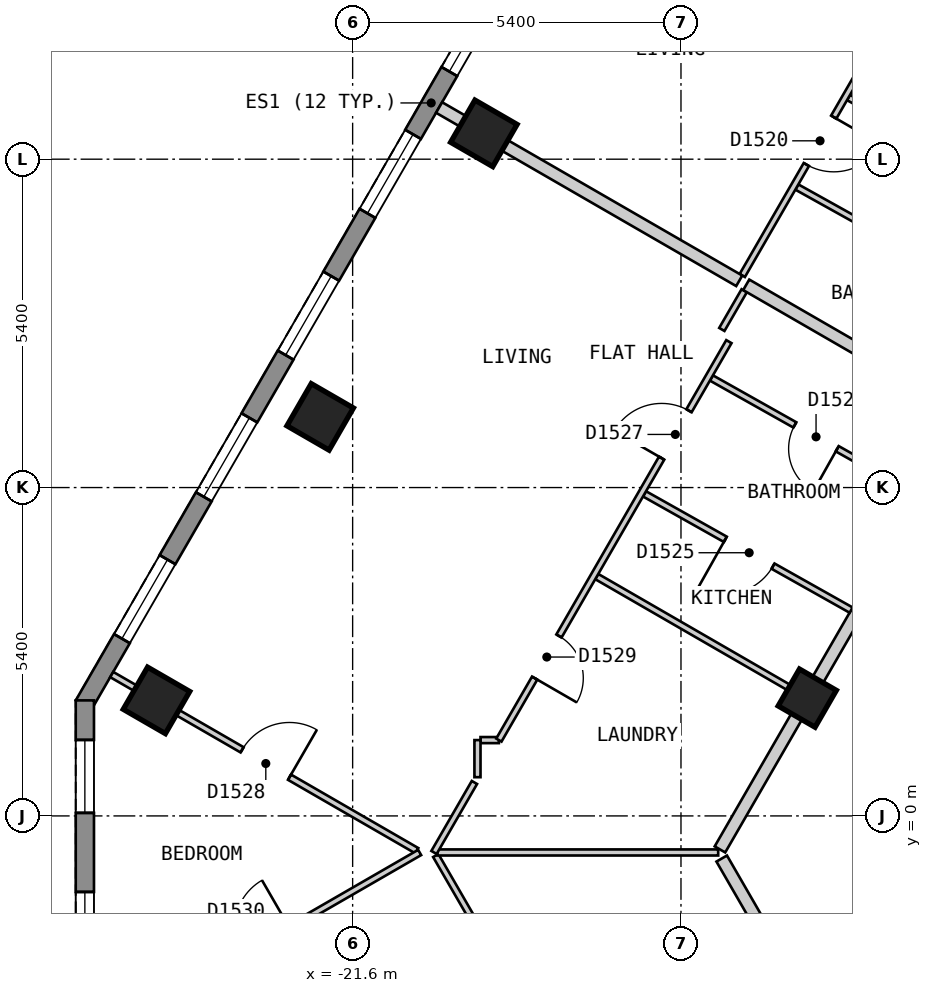
"""IFC4 building model, lengths in metres.
Left out: names, types, materials, properties, quantities, classifications, styles, units other than length and angle.
Written with IfcOpenShell. Run it as: python <this file> out.ifc"""

import sys

from ifc_helpers import new_model, si_unit, direction, frame, frame_2d, origin, origin_2d, place, context, subcontext, project, spatial, polyline, rectangle, outline, extrude, element, fill, save


model = new_model("IFC4")
c1 = context("Model", 3, precision=1e-05, world=origin(), true_north=direction((0.0, 1.0)))
c2 = subcontext(c1, "Body", "Model", "MODEL_VIEW")
j1 = project(units=[si_unit("LENGTHUNIT", "METRE"), si_unit("PLANEANGLEUNIT", "RADIAN")], contexts=[c1])
p1 = place(None, origin())
s1 = spatial("IfcSite", under=j1, at=p1, CompositionType="ELEMENT")
p2 = place(p1, origin())
s2 = spatial("IfcBuilding", under=s1, at=p2, CompositionType="ELEMENT")
p3 = place(p2, frame((0.0, 0.0, 190.2)))
s3 = spatial("IfcBuildingStorey", under=s2, at=p3, CompositionType="ELEMENT", Elevation=190.2)
for number, where, z_axis, x_axis in (
    (1, (-19.442, 11.225, 0.0), (0.0, 0.0, 1.0), (-0.5, -0.866, 0.0)),
    (2, (-22.134, 6.562, 0.0), (0.0, 0.0, 1.0), (-0.5, -0.866, 0.0)),
    (3, (-24.826, 1.9, 0.0), (0.0, 0.0, 1.0), (-0.5, -0.866, 0.0)),
):
    element("IfcColumn", number, at=place(p3, frame(where, z_axis=z_axis, x_axis=x_axis)), inside=s3, PredefinedType="COLUMN", context=c2, shape_type="SweptSolid", body=[
        extrude(rectangle(XDim=0.8, YDim=0.8, at=origin_2d()), origin(), (0.0, 0.0, 1.0), 3.0),
    ])
p4 = place(p3, frame((-14.123, 1.937, 0.0), z_axis=(0.0, 0.0, 1.0), x_axis=(-0.5, -0.866025403784, 0.0)))
e4 = element("IfcColumn", 4, at=p4, inside=s3, PredefinedType="COLUMN", context=c2, shape_type="SweptSolid", body=[
    extrude(rectangle(XDim=0.7, YDim=0.7, at=origin_2d()), origin(), (0.0, 0.0, 1.0), 3.0),
])
p5 = place(p3, frame((-14.592, 21.625, 0.0), z_axis=(0.0, 0.0, 1.0), x_axis=(-0.500010537973, -0.866019319597, 0.0)))
e5 = element("IfcWall", 5, at=p5, inside=s3, PredefinedType="SOLIDWALL", context=c2, shape_type="SweptSolid", body=[
    extrude(outline(polyline([(0.0, -0.15), (22.863, -0.15), (22.783, 0.15), (0.08, 0.15), (0.0, -0.15)])), origin(), (0.0, 0.0, 1.0), 2.7),
])
p6 = place(p5, frame((1.259, 0.0, 0.15)))
e6 = element("IfcOpeningElement", 6, at=p6, cuts=e5, PredefinedType="OPENING", context=c2, shape_type="SweptSolid", body=[
    extrude(rectangle(XDim=1.5, YDim=2.1, at=frame_2d((0.75, 1.05))), frame((0.0, 0.16, 0.0), z_axis=(0.0, -1.0, 0.0), x_axis=(1.0, 0.0, 0.0)), (0.0, 0.0, 1.0), 0.32),
])
p7 = place(p5, frame((3.952, 0.0, 0.15)))
e7 = element("IfcOpeningElement", 7, at=p7, cuts=e5, PredefinedType="OPENING", context=c2, shape_type="SweptSolid", body=[
    extrude(rectangle(XDim=1.5, YDim=2.1, at=frame_2d((0.75, 1.05))), frame((0.0, 0.16, 0.0), z_axis=(0.0, -1.0, 0.0), x_axis=(1.0, 0.0, 0.0)), (0.0, 0.0, 1.0), 0.32),
])
p8 = place(p5, frame((6.644, 0.0, 0.15)))
e8 = element("IfcOpeningElement", 8, at=p8, cuts=e5, PredefinedType="OPENING", context=c2, shape_type="SweptSolid", body=[
    extrude(rectangle(XDim=1.5, YDim=2.1, at=frame_2d((0.75, 1.05))), frame((0.0, 0.16, 0.0), z_axis=(0.0, -1.0, 0.0), x_axis=(1.0, 0.0, 0.0)), (0.0, 0.0, 1.0), 0.32),
])
p9 = place(p5, frame((9.335, 0.0, 0.15)))
e9 = element("IfcOpeningElement", 9, at=p9, cuts=e5, PredefinedType="OPENING", context=c2, shape_type="SweptSolid", body=[
    extrude(rectangle(XDim=1.5, YDim=2.1, at=frame_2d((0.75, 1.05))), frame((0.0, 0.16, 0.0), z_axis=(0.0, -1.0, 0.0), x_axis=(1.0, 0.0, 0.0)), (0.0, 0.0, 1.0), 0.32),
])
p10 = place(p5, frame((12.028, 0.0, 0.15)))
e10 = element("IfcOpeningElement", 10, at=p10, cuts=e5, PredefinedType="OPENING", context=c2, shape_type="SweptSolid", body=[
    extrude(rectangle(XDim=1.5, YDim=2.1, at=frame_2d((0.75, 1.05))), frame((0.0, 0.16, 0.0), z_axis=(0.0, -1.0, 0.0), x_axis=(1.0, 0.0, 0.0)), (0.0, 0.0, 1.0), 0.32),
])
p11 = place(p5, frame((14.72, 0.0, 0.15)))
e11 = element("IfcOpeningElement", 11, at=p11, cuts=e5, PredefinedType="OPENING", context=c2, shape_type="SweptSolid", body=[
    extrude(rectangle(XDim=1.5, YDim=2.1, at=frame_2d((0.75, 1.05))), frame((0.0, 0.16, 0.0), z_axis=(0.0, -1.0, 0.0), x_axis=(1.0, 0.0, 0.0)), (0.0, 0.0, 1.0), 0.32),
])
p12 = place(p5, frame((17.411, 0.0, 0.15)))
e12 = element("IfcOpeningElement", 12, at=p12, cuts=e5, PredefinedType="OPENING", context=c2, shape_type="SweptSolid", body=[
    extrude(rectangle(XDim=1.5, YDim=2.1, at=frame_2d((0.75, 1.05))), frame((0.0, 0.16, 0.0), z_axis=(0.0, -1.0, 0.0), x_axis=(1.0, 0.0, 0.0)), (0.0, 0.0, 1.0), 0.32),
])
p13 = place(p5, frame((20.104, 0.0, 0.15)))
e13 = element("IfcOpeningElement", 13, at=p13, cuts=e5, PredefinedType="OPENING", context=c2, shape_type="SweptSolid", body=[
    extrude(rectangle(XDim=1.5, YDim=2.1, at=frame_2d((0.75, 1.05))), frame((0.0, 0.16, 0.0), z_axis=(0.0, -1.0, 0.0), x_axis=(1.0, 0.0, 0.0)), (0.0, 0.0, 1.0), 0.32),
])
p14 = place(p3, frame((-26.004, 1.9, 0.0), z_axis=(0.0, 0.0, 1.0), x_axis=(0.0, -1.0, 0.0)))
e14 = element("IfcWall", 14, at=p14, inside=s3, PredefinedType="SOLIDWALL", context=c2, shape_type="SweptSolid", body=[
    extrude(outline(polyline([(0.0, -0.15), (5.0, -0.15), (4.92, 0.15), (0.08, 0.15), (0.0, -0.15)])), origin(), (0.0, 0.0, 1.0), 2.7),
])
p15 = place(p14, frame((0.65, 0.0, 0.15)))
e15 = element("IfcOpeningElement", 15, at=p15, cuts=e14, PredefinedType="OPENING", context=c2, shape_type="SweptSolid", body=[
    extrude(rectangle(XDim=1.2, YDim=2.1, at=frame_2d((0.6, 1.05))), frame((0.0, 0.16, 0.0), z_axis=(0.0, -1.0, 0.0), x_axis=(1.0, 0.0, 0.0)), (0.0, 0.0, 1.0), 0.32),
])
p16 = place(p14, frame((3.15, 0.0, 0.15)))
e16 = element("IfcOpeningElement", 16, at=p16, cuts=e14, PredefinedType="OPENING", context=c2, shape_type="SweptSolid", body=[
    extrude(rectangle(XDim=1.2, YDim=2.1, at=frame_2d((0.6, 1.05))), frame((0.0, 0.16, 0.0), z_axis=(0.0, -1.0, 0.0), x_axis=(1.0, 0.0, 0.0)), (0.0, 0.0, 1.0), 0.32),
])
p17 = place(p3, frame((-15.53, -0.701, 0.0), z_axis=(0.0, 0.0, 1.0), x_axis=(0.499972710878, -0.866041158593, 0.0)))
e17 = element("IfcWall", 17, at=p17, inside=s3, PredefinedType="PARTITIONING", context=c2, shape_type="SweptSolid", body=[
    extrude(rectangle(XDim=2.308, YDim=0.2, at=frame_2d((1.154, 0.0))), origin(), (0.0, 0.0, 1.0), 2.7),
])
p18 = place(p3, frame((-15.559, -0.551, 0.0), z_axis=(0.0, 0.0, 1.0), x_axis=(0.499964997208, 0.866045611713, 0.0)))
e18 = element("IfcWall", 18, at=p18, inside=s3, PredefinedType="PARTITIONING", context=c2, shape_type="SweptSolid", body=[
    extrude(rectangle(XDim=9.643, YDim=0.2, at=frame_2d((4.821, 0.0))), origin(), (0.0, 0.0, 1.0), 2.7),
])
p19 = place(p18, frame((5.088, 0.0, 0.0)))
e19 = element("IfcOpeningElement", 19, at=p19, cuts=e18, PredefinedType="OPENING", context=c2, shape_type="SweptSolid", body=[
    extrude(rectangle(XDim=1.0, YDim=2.1, at=frame_2d((0.5, 1.05))), frame((0.0, 0.11, 0.0), z_axis=(0.0, -1.0, 0.0), x_axis=(1.0, 0.0, 0.0)), (0.0, 0.0, 1.0), 0.22),
])
p20 = place(p3, frame((-20.233, -0.651, 0.0), z_axis=(0.0, 0.0, 1.0), x_axis=(0.500498449207, -0.865737432679, 0.0)))
e20 = element("IfcWall", 20, at=p20, inside=s3, PredefinedType="PARTITIONING", context=c2, shape_type="SweptSolid", body=[
    extrude(rectangle(XDim=1.271, YDim=0.1, at=frame_2d((0.635, 0.0))), origin(), (0.0, 0.0, 1.0), 2.7),
])
p21 = place(p3, frame((-13.444, 11.814, 0.0), z_axis=(0.0, 0.0, 1.0), x_axis=(0.873653620945, -0.486548405207, 0.0)))
e21 = element("IfcWall", 21, at=p21, inside=s3, PredefinedType="PARTITIONING", context=c2, shape_type="SweptSolid", body=[
    extrude(rectangle(XDim=4.051, YDim=0.1, at=frame_2d((2.025, 0.0))), origin(), (0.0, 0.0, 1.0), 2.7),
])
p22 = place(p21, frame((1.6, 0.0, 0.0)))
e22 = element("IfcOpeningElement", 22, at=p22, cuts=e21, PredefinedType="OPENING", context=c2, shape_type="SweptSolid", body=[
    extrude(rectangle(XDim=0.9, YDim=2.1, at=frame_2d((0.45, 1.05))), frame((0.0, 0.06, 0.0), z_axis=(0.0, -1.0, 0.0), x_axis=(1.0, 0.0, 0.0)), (0.0, 0.0, 1.0), 0.12),
])
p23 = place(p3, frame((-14.294, 10.342, 0.0), z_axis=(0.0, 0.0, 1.0), x_axis=(0.873582256032, -0.486676527013, 0.0)))
e23 = element("IfcWall", 23, at=p23, inside=s3, PredefinedType="PARTITIONING", context=c2, shape_type="SweptSolid", body=[
    extrude(rectangle(XDim=4.05, YDim=0.1, at=frame_2d((2.025, 0.0))), origin(), (0.0, 0.0, 1.0), 2.7),
])
p24 = place(p23, frame((1.65, 0.0, 0.0)))
e24 = element("IfcOpeningElement", 24, at=p24, cuts=e23, PredefinedType="OPENING", context=c2, shape_type="SweptSolid", body=[
    extrude(rectangle(XDim=0.8, YDim=2.1, at=frame_2d((0.4, 1.05))), frame((0.0, 0.06, 0.0), z_axis=(0.0, -1.0, 0.0), x_axis=(1.0, 0.0, 0.0)), (0.0, 0.0, 1.0), 0.12),
])
p25 = place(p3, frame((-16.799, 5.296, 0.0), z_axis=(0.0, 0.0, 1.0), x_axis=(0.871565499758, -0.490279083413, 0.0)))
e25 = element("IfcWall", 25, at=p25, inside=s3, PredefinedType="PARTITIONING", context=c2, shape_type="SweptSolid", body=[
    extrude(rectangle(XDim=3.897, YDim=0.1, at=frame_2d((1.949, 0.0))), origin(), (0.0, 0.0, 1.0), 2.7),
])
p26 = place(p25, frame((1.524, 0.0, 0.0)))
e26 = element("IfcOpeningElement", 26, at=p26, cuts=e25, PredefinedType="OPENING", context=c2, shape_type="SweptSolid", body=[
    extrude(rectangle(XDim=0.9, YDim=2.1, at=frame_2d((0.45, 1.05))), frame((0.0, 0.06, 0.0), z_axis=(0.0, -1.0, 0.0), x_axis=(1.0, 0.0, 0.0)), (0.0, 0.0, 1.0), 0.12),
])
p27 = place(p3, frame((-15.699, 7.202, 0.0), z_axis=(0.0, 0.0, 1.0), x_axis=(0.871565499758, -0.490279083413, 0.0)))
e27 = element("IfcWall", 27, at=p27, inside=s3, PredefinedType="PARTITIONING", context=c2, shape_type="SweptSolid", body=[
    extrude(rectangle(XDim=3.897, YDim=0.1, at=frame_2d((1.949, 0.0))), origin(), (0.0, 0.0, 1.0), 2.7),
])
p28 = place(p27, frame((1.574, 0.0, 0.0)))
e28 = element("IfcOpeningElement", 28, at=p28, cuts=e27, PredefinedType="OPENING", context=c2, shape_type="SweptSolid", body=[
    extrude(rectangle(XDim=0.8, YDim=2.1, at=frame_2d((0.4, 1.05))), frame((0.0, 0.06, 0.0), z_axis=(0.0, -1.0, 0.0), x_axis=(1.0, 0.0, 0.0)), (0.0, 0.0, 1.0), 0.12),
])
p29 = place(p3, frame((-17.585, 3.936, 0.0), z_axis=(0.0, 0.0, 1.0), x_axis=(0.865979019114, -0.500080332001, 0.0)))
e29 = element("IfcWall", 29, at=p29, inside=s3, PredefinedType="PARTITIONING", context=c2, shape_type="SweptSolid", body=[
    extrude(rectangle(XDim=3.897, YDim=0.1, at=frame_2d((1.949, 0.0))), origin(), (0.0, 0.0, 1.0), 2.7),
])
p30 = place(p3, frame((-25.562, 2.325, 0.0), z_axis=(0.0, 0.0, 1.0), x_axis=(0.86599890761, -0.500045889912, 0.0)))
e30 = element("IfcWall", 30, at=p30, inside=s3, PredefinedType="PARTITIONING", context=c2, shape_type="SweptSolid", body=[
    extrude(rectangle(XDim=5.793, YDim=0.1, at=frame_2d((2.897, 0.0))), origin(), (0.0, 0.0, 1.0), 2.7),
])
p31 = place(p30, frame((2.476, 0.0, 0.0)))
e31 = element("IfcOpeningElement", 31, at=p31, cuts=e30, PredefinedType="OPENING", context=c2, shape_type="SweptSolid", body=[
    extrude(rectangle(XDim=0.9, YDim=2.1, at=frame_2d((0.45, 1.05))), frame((0.0, 0.06, 0.0), z_axis=(0.0, -1.0, 0.0), x_axis=(1.0, 0.0, 0.0)), (0.0, 0.0, 1.0), 0.12),
])
p32 = place(p3, frame((-20.204, -0.601, 0.0), z_axis=(0.0, 0.0, 1.0), x_axis=(1.0, 0.0, 0.0)))
e32 = element("IfcWall", 32, at=p32, inside=s3, PredefinedType="PARTITIONING", context=c2, shape_type="SweptSolid", body=[
    extrude(rectangle(XDim=4.616, YDim=0.1, at=frame_2d((2.308, 0.0))), origin(), (0.0, 0.0, 1.0), 2.7),
])
p33 = place(p3, frame((-19.497, 1.247, 0.0), z_axis=(0.0, 0.0, 1.0), x_axis=(1.0, 0.0, 0.0)))
e33 = element("IfcWall", 33, at=p33, inside=s3, PredefinedType="PARTITIONING", context=c2, shape_type="SweptSolid", body=[
    extrude(rectangle(XDim=0.302, YDim=0.1, at=frame_2d((0.151, 0.0))), origin(), (0.0, 0.0, 1.0), 2.7),
])
p34 = place(p3, frame((-20.262, -0.601, 0.0), z_axis=(0.0, 0.0, 1.0), x_axis=(0.500247001515, 0.86588275042, 0.0)))
e34 = element("IfcWall", 34, at=p34, inside=s3, PredefinedType="PARTITIONING", context=c2, shape_type="SweptSolid", body=[
    extrude(rectangle(XDim=1.329, YDim=0.1, at=frame_2d((0.665, 0.0))), origin(), (0.0, 0.0, 1.0), 2.7),
])
p35 = place(p3, frame((-19.195, 1.247, 0.0), z_axis=(0.0, 0.0, 1.0), x_axis=(0.499959862915, 0.866048575701, 0.0)))
e35 = element("IfcWall", 35, at=p35, inside=s3, PredefinedType="PARTITIONING", context=c2, shape_type="SweptSolid", body=[
    extrude(rectangle(XDim=7.566, YDim=0.1, at=frame_2d((3.783, 0.0))), origin(), (0.0, 0.0, 1.0), 2.7),
])
p36 = place(p35, frame((5.354, 0.0, 0.0)))
e36 = element("IfcOpeningElement", 36, at=p36, cuts=e35, PredefinedType="OPENING", context=c2, shape_type="SweptSolid", body=[
    extrude(rectangle(XDim=0.9, YDim=2.1, at=frame_2d((0.45, 1.05))), frame((0.0, 0.06, 0.0), z_axis=(0.0, -1.0, 0.0), x_axis=(1.0, 0.0, 0.0)), (0.0, 0.0, 1.0), 0.12),
])
p37 = place(p35, frame((1.177, 0.0, 0.0)))
e37 = element("IfcOpeningElement", 37, at=p37, cuts=e35, PredefinedType="OPENING", context=c2, shape_type="SweptSolid", body=[
    extrude(rectangle(XDim=0.8, YDim=2.1, at=frame_2d((0.4, 1.05))), frame((0.0, 0.06, 0.0), z_axis=(0.0, -1.0, 0.0), x_axis=(1.0, 0.0, 0.0)), (0.0, 0.0, 1.0), 0.12),
])
p38 = place(p3, frame((-15.528, 8.0, 0.0), z_axis=(0.0, 0.0, 1.0), x_axis=(0.500421336976, 0.865782008071, 0.0)))
e38 = element("IfcWall", 38, at=p38, inside=s3, PredefinedType="PARTITIONING", context=c2, shape_type="SweptSolid", body=[
    extrude(rectangle(XDim=0.736, YDim=0.1, at=frame_2d((0.368, 0.0))), origin(), (0.0, 0.0, 1.0), 2.7),
])
p39 = place(p3, frame((-15.192, 8.887, 0.0), z_axis=(0.0, 0.0, 1.0), x_axis=(0.500028204665, 0.866009119201, 0.0)))
e39 = element("IfcWall", 39, at=p39, inside=s3, PredefinedType="PARTITIONING", context=c2, shape_type="SweptSolid", body=[
    extrude(rectangle(XDim=10.667, YDim=0.1, at=frame_2d((5.334, 0.0))), origin(), (0.0, 0.0, 1.0), 2.7),
])
p40 = place(p39, frame((2.108, 0.0, 0.0)))
e40 = element("IfcOpeningElement", 40, at=p40, cuts=e39, PredefinedType="OPENING", context=c2, shape_type="SweptSolid", body=[
    extrude(rectangle(XDim=0.9, YDim=2.1, at=frame_2d((0.45, 1.05))), frame((0.0, 0.06, 0.0), z_axis=(0.0, -1.0, 0.0), x_axis=(1.0, 0.0, 0.0)), (0.0, 0.0, 1.0), 0.12),
])
p41 = place(p39, frame((7.576, 0.0, 0.0)))
e41 = element("IfcOpeningElement", 41, at=p41, cuts=e39, PredefinedType="OPENING", context=c2, shape_type="SweptSolid", body=[
    extrude(rectangle(XDim=0.8, YDim=2.1, at=frame_2d((0.4, 1.05))), frame((0.0, 0.06, 0.0), z_axis=(0.0, -1.0, 0.0), x_axis=(1.0, 0.0, 0.0)), (0.0, 0.0, 1.0), 0.12),
])
p42 = place(p3, frame((-19.547, 0.637, 0.0), z_axis=(0.0, 0.0, 1.0), x_axis=(0.0, 1.0, 0.0)))
e42 = element("IfcWall", 42, at=p42, inside=s3, PredefinedType="PARTITIONING", context=c2, shape_type="SweptSolid", body=[
    extrude(rectangle(XDim=0.61, YDim=0.1, at=frame_2d((0.305, 0.0))), origin(), (0.0, 0.0, 1.0), 2.7),
])
p43 = place(p3, frame((-25.563, -3.524, 0.0), z_axis=(0.0, 0.0, 1.0), x_axis=(0.866128586522, 0.499821239653, 0.0)))
e43 = element("IfcWall", 43, at=p43, inside=s3, PredefinedType="PARTITIONING", context=c2, shape_type="SweptSolid", body=[
    extrude(rectangle(XDim=5.848, YDim=0.1, at=frame_2d((2.924, 0.0))), origin(), (0.0, 0.0, 1.0), 2.7),
])
p44 = place(p43, frame((2.474, 0.0, 0.0)))
e44 = element("IfcOpeningElement", 44, at=p44, cuts=e43, PredefinedType="OPENING", context=c2, shape_type="SweptSolid", body=[
    extrude(rectangle(XDim=0.9, YDim=2.1, at=frame_2d((0.45, 1.05))), frame((0.0, 0.06, 0.0), z_axis=(0.0, -1.0, 0.0), x_axis=(1.0, 0.0, 0.0)), (0.0, 0.0, 1.0), 0.12),
])
p45 = place(p3, frame((-20.178, 11.65, 0.0), z_axis=(0.0, 0.0, 1.0), x_axis=(0.866022950691, -0.500004248858, 0.0)))
e45 = element("IfcWall", 45, at=p45, inside=s3, PredefinedType="PARTITIONING", context=c2, shape_type="SweptSolid", body=[
    extrude(rectangle(XDim=5.7, YDim=0.2, at=frame_2d((2.85, 0.0))), origin(), (0.0, 0.0, 1.0), 2.7),
])
p46 = place(p3, frame((-15.127, 8.734, 0.0), z_axis=(0.0, 0.0, 1.0), x_axis=(0.865984601828, -0.500070664403, 0.0)))
e46 = element("IfcWall", 46, at=p46, inside=s3, PredefinedType="PARTITIONING", context=c2, shape_type="SweptSolid", body=[
    extrude(rectangle(XDim=4.167, YDim=0.2, at=frame_2d((2.084, 0.0))), origin(), (0.0, 0.0, 1.0), 2.7),
])
p47 = place(p9, origin())
e47 = element("IfcWindow", 47, at=p47, inside=s3, PartitioningType="SINGLE_PANEL", PredefinedType="WINDOW", context=c2, shape_type="SweptSolid", body=[
    extrude(rectangle(XDim=1.5, YDim=2.1, at=frame_2d((0.75, 1.05))), frame((0.0, 0.03, 0.0), z_axis=(0.0, -1.0, 0.0), x_axis=(1.0, 0.0, 0.0)), (0.0, 0.0, 1.0), 0.06),
])
fill(e9, e47)
p48 = place(p10, origin())
e48 = element("IfcWindow", 48, at=p48, inside=s3, PartitioningType="SINGLE_PANEL", PredefinedType="WINDOW", context=c2, shape_type="SweptSolid", body=[
    extrude(rectangle(XDim=1.5, YDim=2.1, at=frame_2d((0.75, 1.05))), frame((0.0, 0.03, 0.0), z_axis=(0.0, -1.0, 0.0), x_axis=(1.0, 0.0, 0.0)), (0.0, 0.0, 1.0), 0.06),
])
fill(e10, e48)
p49 = place(p11, origin())
e49 = element("IfcWindow", 49, at=p49, inside=s3, PartitioningType="SINGLE_PANEL", PredefinedType="WINDOW", context=c2, shape_type="SweptSolid", body=[
    extrude(rectangle(XDim=1.5, YDim=2.1, at=frame_2d((0.75, 1.05))), frame((0.0, 0.03, 0.0), z_axis=(0.0, -1.0, 0.0), x_axis=(1.0, 0.0, 0.0)), (0.0, 0.0, 1.0), 0.06),
])
fill(e11, e49)
p50 = place(p12, origin())
e50 = element("IfcWindow", 50, at=p50, inside=s3, PartitioningType="SINGLE_PANEL", PredefinedType="WINDOW", context=c2, shape_type="SweptSolid", body=[
    extrude(rectangle(XDim=1.5, YDim=2.1, at=frame_2d((0.75, 1.05))), frame((0.0, 0.03, 0.0), z_axis=(0.0, -1.0, 0.0), x_axis=(1.0, 0.0, 0.0)), (0.0, 0.0, 1.0), 0.06),
])
fill(e12, e50)
p51 = place(p13, origin())
e51 = element("IfcWindow", 51, at=p51, inside=s3, PartitioningType="SINGLE_PANEL", PredefinedType="WINDOW", context=c2, shape_type="SweptSolid", body=[
    extrude(rectangle(XDim=1.5, YDim=2.1, at=frame_2d((0.75, 1.05))), frame((0.0, 0.03, 0.0), z_axis=(0.0, -1.0, 0.0), x_axis=(1.0, 0.0, 0.0)), (0.0, 0.0, 1.0), 0.06),
])
fill(e13, e51)
p52 = place(p15, origin())
e52 = element("IfcWindow", 52, at=p52, inside=s3, PartitioningType="SINGLE_PANEL", PredefinedType="WINDOW", context=c2, shape_type="SweptSolid", body=[
    extrude(rectangle(XDim=1.2, YDim=2.1, at=frame_2d((0.6, 1.05))), frame((0.0, 0.03, 0.0), z_axis=(0.0, -1.0, 0.0), x_axis=(1.0, 0.0, 0.0)), (0.0, 0.0, 1.0), 0.06),
])
fill(e15, e52)
p53 = place(p16, origin())
e53 = element("IfcWindow", 53, at=p53, inside=s3, PartitioningType="SINGLE_PANEL", PredefinedType="WINDOW", context=c2, shape_type="SweptSolid", body=[
    extrude(rectangle(XDim=1.2, YDim=2.1, at=frame_2d((0.6, 1.05))), frame((0.0, 0.03, 0.0), z_axis=(0.0, -1.0, 0.0), x_axis=(1.0, 0.0, 0.0)), (0.0, 0.0, 1.0), 0.06),
])
fill(e16, e53)
p54 = place(p40, origin())
e54 = element("IfcDoor", 54, at=p54, inside=s3, OperationType="SINGLE_SWING_RIGHT", PredefinedType="DOOR", context=c2, shape_type="SweptSolid", body=[
    extrude(rectangle(XDim=0.9, YDim=2.1, at=frame_2d((0.45, 1.05))), frame((0.0, 0.025, 0.0), z_axis=(0.0, -1.0, 0.0), x_axis=(1.0, 0.0, 0.0)), (0.0, 0.0, 1.0), 0.05),
])
fill(e40, e54)
p55 = place(p26, origin())
e55 = element("IfcDoor", 55, at=p55, inside=s3, OperationType="SINGLE_SWING_LEFT", PredefinedType="DOOR", context=c2, shape_type="SweptSolid", body=[
    extrude(rectangle(XDim=0.9, YDim=2.1, at=frame_2d((0.45, 1.05))), frame((0.0, 0.025, 0.0), z_axis=(0.0, -1.0, 0.0), x_axis=(1.0, 0.0, 0.0)), (0.0, 0.0, 1.0), 0.05),
])
fill(e26, e55)
p56 = place(p28, origin())
e56 = element("IfcDoor", 56, at=p56, inside=s3, OperationType="SINGLE_SWING_RIGHT", PredefinedType="DOOR", context=c2, shape_type="SweptSolid", body=[
    extrude(rectangle(XDim=0.8, YDim=2.1, at=frame_2d((0.4, 1.05))), frame((0.0, 0.025, 0.0), z_axis=(0.0, -1.0, 0.0), x_axis=(1.0, 0.0, 0.0)), (0.0, 0.0, 1.0), 0.05),
])
fill(e28, e56)
p57 = place(p36, origin())
e57 = element("IfcDoor", 57, at=p57, inside=s3, OperationType="SINGLE_SWING_LEFT", PredefinedType="DOOR", context=c2, shape_type="SweptSolid", body=[
    extrude(rectangle(XDim=0.9, YDim=2.1, at=frame_2d((0.45, 1.05))), frame((0.0, 0.025, 0.0), z_axis=(0.0, -1.0, 0.0), x_axis=(1.0, 0.0, 0.0)), (0.0, 0.0, 1.0), 0.05),
])
fill(e36, e57)
p58 = place(p31, origin())
e58 = element("IfcDoor", 58, at=p58, inside=s3, OperationType="SINGLE_SWING_RIGHT", PredefinedType="DOOR", context=c2, shape_type="SweptSolid", body=[
    extrude(rectangle(XDim=0.9, YDim=2.1, at=frame_2d((0.45, 1.05))), frame((0.0, 0.025, 0.0), z_axis=(0.0, -1.0, 0.0), x_axis=(1.0, 0.0, 0.0)), (0.0, 0.0, 1.0), 0.05),
])
fill(e31, e58)
p59 = place(p37, origin())
e59 = element("IfcDoor", 59, at=p59, inside=s3, OperationType="SINGLE_SWING_LEFT", PredefinedType="DOOR", context=c2, shape_type="SweptSolid", body=[
    extrude(rectangle(XDim=0.8, YDim=2.1, at=frame_2d((0.4, 1.05))), frame((0.0, 0.025, 0.0), z_axis=(0.0, -1.0, 0.0), x_axis=(1.0, 0.0, 0.0)), (0.0, 0.0, 1.0), 0.05),
])
fill(e37, e59)
save(model, sys.argv[1])
